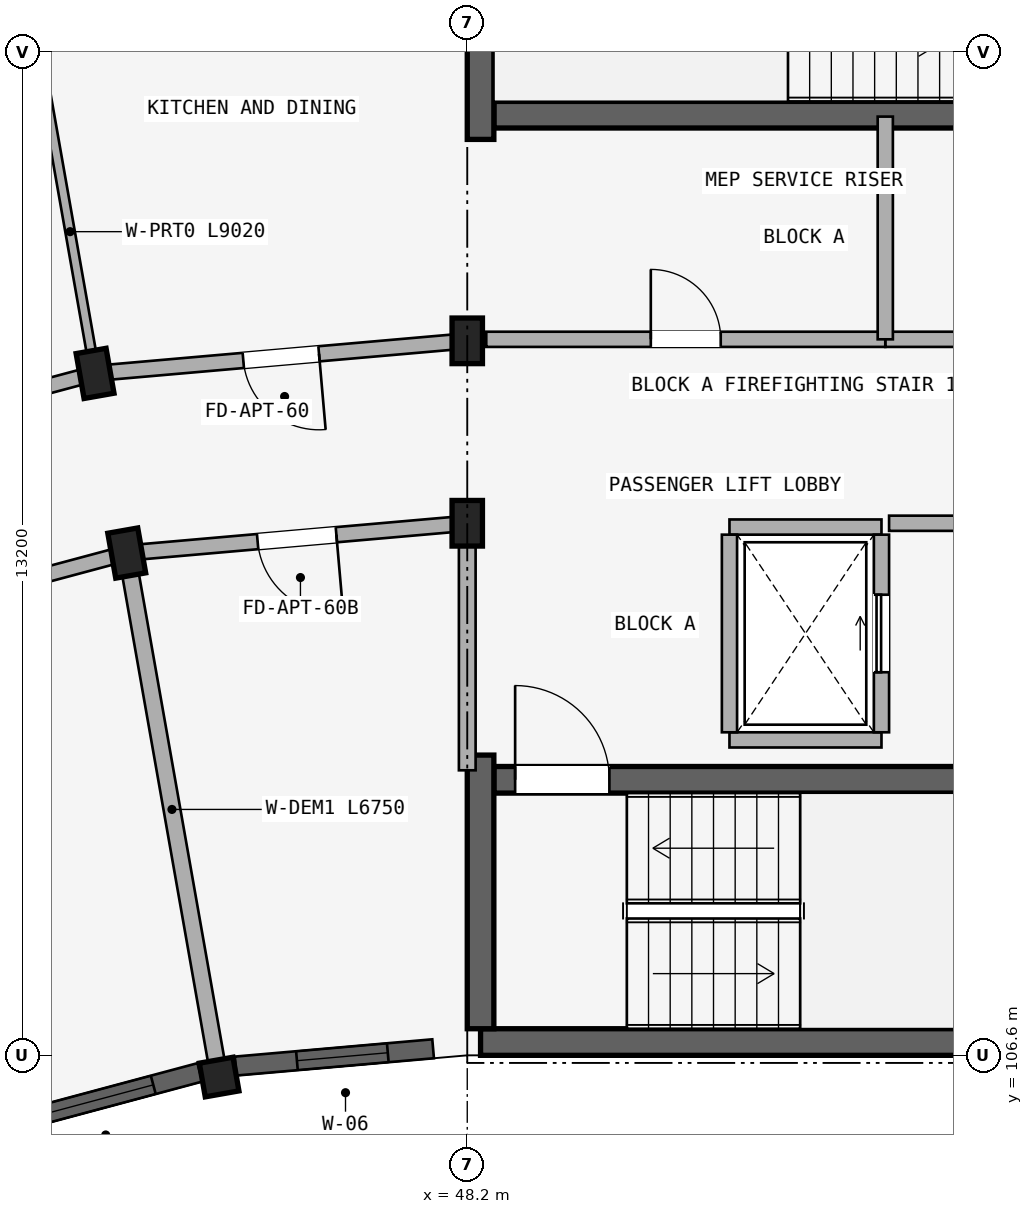
"""IFC4 building model, lengths in metres.
Left out: names, types, materials, properties, quantities, classifications, styles, units other than length and angle.
Written with IfcOpenShell. Run it as: python <this file> out.ifc"""

import sys

from ifc_helpers import new_model, si_unit, direction, frame, frame_2d, origin, origin_2d, place, context, subcontext, project, spatial, rectangle, extrude, element, fill, save


model = new_model("IFC4")
c1 = context("Model", 3, precision=1e-05, world=origin(), true_north=direction((0.0, 1.0)))
c2 = subcontext(c1, "Body", "Model", "MODEL_VIEW")
j1 = project(units=[si_unit("LENGTHUNIT", "METRE"), si_unit("PLANEANGLEUNIT", "RADIAN")], contexts=[c1])
p1 = place(None, origin())
s1 = spatial("IfcSite", under=j1, at=p1, CompositionType="ELEMENT")
p2 = place(p1, origin())
s2 = spatial("IfcBuilding", under=s1, at=p2, CompositionType="ELEMENT")
p3 = place(p2, frame((0.0, 0.0, 46.5)))
s3 = spatial("IfcBuildingStorey", under=s2, at=p3, CompositionType="ELEMENT", Elevation=46.5)
p4 = place(p3, frame((48.55, 118.975, 0.0), z_axis=(0.0, 0.0, 1.0), x_axis=(1.0, 0.0, 0.0)))
e1 = element("IfcWall", 1, at=p4, inside=s3, PredefinedType="SHEAR", context=c2, shape_type="SweptSolid", body=[
    extrude(rectangle(XDim=8.075, YDim=0.35, at=frame_2d((4.038, 0.0))), origin(), (0.0, 0.0, 1.0), 2.93),
])
p5 = place(p4, frame((6.38, 0.0, 0.0)))
e2 = element("IfcOpeningElement", 2, at=p5, cuts=e1, PredefinedType="OPENING", context=c2, shape_type="SweptSolid", body=[
    extrude(rectangle(XDim=1.24, YDim=2.15, at=frame_2d((0.62, 1.075))), frame((0.0, 0.185, 0.0), z_axis=(0.0, -1.0, 0.0), x_axis=(1.0, 0.0, 0.0)), (0.0, 0.0, 1.0), 0.37),
])
p6 = place(p3, frame((48.375, 118.65, 0.0), z_axis=(0.0, 0.0, 1.0), x_axis=(0.0, 1.0, 0.0)))
e3 = element("IfcWall", 3, at=p6, inside=s3, PredefinedType="SHEAR", context=c2, shape_type="SweptSolid", body=[
    extrude(rectangle(XDim=3.6, YDim=0.35, at=frame_2d((1.8, 0.0))), origin(), (0.0, 0.0, 1.0), 2.93),
])
p7 = place(p3, frame((48.375, 106.775, 0.0), z_axis=(0.0, 0.0, 1.0), x_axis=(1.0, 0.0, 0.0)))
e4 = element("IfcWall", 4, at=p7, inside=s3, PredefinedType="SHEAR", context=c2, shape_type="SweptSolid", body=[
    extrude(rectangle(XDim=8.25, YDim=0.35, at=frame_2d((4.125, 0.0))), origin(), (0.0, 0.0, 1.0), 2.93),
])
p8 = place(p3, frame((48.55, 110.225, 0.0), z_axis=(0.0, 0.0, 1.0), x_axis=(1.0, 0.0, 0.0)))
e5 = element("IfcWall", 5, at=p8, inside=s3, PredefinedType="SHEAR", context=c2, shape_type="SweptSolid", body=[
    extrude(rectangle(XDim=7.9, YDim=0.35, at=frame_2d((3.95, 0.0))), origin(), (0.0, 0.0, 1.0), 2.93),
])
p9 = place(p8, frame((0.28, 0.0, 0.0)))
e6 = element("IfcOpeningElement", 6, at=p9, cuts=e5, PredefinedType="OPENING", context=c2, shape_type="SweptSolid", body=[
    extrude(rectangle(XDim=1.24, YDim=2.15, at=frame_2d((0.62, 1.075))), frame((0.0, 0.185, 0.0), z_axis=(0.0, -1.0, 0.0), x_axis=(1.0, 0.0, 0.0)), (0.0, 0.0, 1.0), 0.37),
])
p10 = place(p3, frame((48.375, 106.95, 0.0), z_axis=(0.0, 0.0, 1.0), x_axis=(0.0, 1.0, 0.0)))
e7 = element("IfcWall", 7, at=p10, inside=s3, PredefinedType="SHEAR", context=c2, shape_type="SweptSolid", body=[
    extrude(rectangle(XDim=3.6, YDim=0.35, at=frame_2d((1.8, 0.0))), origin(), (0.0, 0.0, 1.0), 2.93),
])
for number, where, z_axis, x_axis in (
    (8, (48.2, 113.6, 0.0), (0.0, 0.0, 1.0), (1.0, 0.0, 0.0)),
    (9, (48.2, 116.0, 0.0), (0.0, 0.0, 1.0), (1.0, 0.0, 0.0)),
):
    element("IfcColumn", number, at=place(p3, frame(where, z_axis=z_axis, x_axis=x_axis)), inside=s3, PredefinedType="COLUMN", context=c2, shape_type="SweptSolid", body=[
        extrude(rectangle(XDim=0.4, YDim=0.6, at=origin_2d()), origin(), (0.0, 0.0, 1.0), 2.93),
    ])
p11 = place(p3, frame((44.935, 106.314, 0.0), z_axis=(0.0, 0.0, 1.0), x_axis=(0.984807753012, 0.173648177667, 0.0)))
e10 = element("IfcColumn", 10, at=p11, inside=s3, PredefinedType="COLUMN", context=c2, shape_type="SweptSolid", body=[
    extrude(rectangle(XDim=0.45, YDim=0.45, at=origin_2d()), origin(), (0.0, 0.0, 1.0), 2.93),
])
for number, where, z_axis, x_axis in (
    (11, (43.72, 113.208, 0.0), (0.0, 0.0, 1.0), (0.985, 0.174, 0.0)),
    (12, (43.303, 115.572, 0.0), (0.0, 0.0, 1.0), (0.985, 0.174, 0.0)),
):
    element("IfcColumn", number, at=place(p3, frame(where, z_axis=z_axis, x_axis=x_axis)), inside=s3, PredefinedType="COLUMN", context=c2, shape_type="SweptSolid", body=[
        extrude(rectangle(XDim=0.4, YDim=0.6, at=origin_2d()), origin(), (0.0, 0.0, 1.0), 2.93),
    ])
p12 = place(p3, frame((53.7, 116.02, 0.0), z_axis=(0.0, 0.0, 1.0), x_axis=(1.0, 0.0, 0.0)))
e13 = element("IfcWall", 13, at=p12, inside=s3, PredefinedType="STANDARD", context=c2, shape_type="SweptSolid", body=[
    extrude(rectangle(XDim=5.65, YDim=0.2, at=frame_2d((2.825, 0.0))), origin(), (0.0, 0.0, 1.0), 2.372),
])
p13 = place(p12, frame((1.923, 0.0, 0.0)))
e14 = element("IfcOpeningElement", 14, at=p13, cuts=e13, PredefinedType="OPENING", context=c2, shape_type="SweptSolid", body=[
    extrude(rectangle(XDim=1.24, YDim=2.15, at=frame_2d((0.62, 1.075))), frame((0.0, 0.11, 0.0), z_axis=(0.0, -1.0, 0.0), x_axis=(1.0, 0.0, 0.0)), (0.0, 0.0, 1.0), 0.22),
])
p14 = place(p3, frame((48.45, 116.02, 0.0), z_axis=(0.0, 0.0, 1.0), x_axis=(1.0, 0.0, 0.0)))
e15 = element("IfcWall", 15, at=p14, inside=s3, PredefinedType="STANDARD", context=c2, shape_type="SweptSolid", body=[
    extrude(rectangle(XDim=5.25, YDim=0.2, at=frame_2d((2.625, 0.0))), origin(), (0.0, 0.0, 1.0), 2.372),
])
p15 = place(p14, frame((2.165, 0.0, 0.0)))
e16 = element("IfcOpeningElement", 16, at=p15, cuts=e15, PredefinedType="OPENING", context=c2, shape_type="SweptSolid", body=[
    extrude(rectangle(XDim=0.92, YDim=2.1, at=frame_2d((0.46, 1.05))), frame((0.0, 0.11, 0.0), z_axis=(0.0, -1.0, 0.0), x_axis=(1.0, 0.0, 0.0)), (0.0, 0.0, 1.0), 0.22),
])
p16 = place(p3, frame((53.7, 116.02, 0.0), z_axis=(0.0, 0.0, 1.0), x_axis=(0.0, 1.0, 0.0)))
e17 = element("IfcWall", 17, at=p16, inside=s3, PredefinedType="STANDARD", context=c2, shape_type="SweptSolid", body=[
    extrude(rectangle(XDim=2.93, YDim=0.2, at=frame_2d((1.465, 0.0))), origin(), (0.0, 0.0, 1.0), 2.372),
])
p17 = place(p3, frame((51.65, 110.75, 0.0), z_axis=(0.0, 0.0, 1.0), x_axis=(1.0, 0.0, 0.0)))
e18 = element("IfcWall", 18, at=p17, inside=s3, PredefinedType="STANDARD", context=c2, shape_type="SweptSolid", body=[
    extrude(rectangle(XDim=2.0, YDim=0.2, at=frame_2d((1.0, 0.0))), origin(), (0.0, 0.0, 1.0), 2.93),
])
p18 = place(p3, frame((51.65, 113.55, 0.0), z_axis=(0.0, 0.0, 1.0), x_axis=(1.0, 0.0, 0.0)))
e19 = element("IfcWall", 19, at=p18, inside=s3, PredefinedType="STANDARD", context=c2, shape_type="SweptSolid", body=[
    extrude(rectangle(XDim=2.0, YDim=0.2, at=frame_2d((1.0, 0.0))), origin(), (0.0, 0.0, 1.0), 2.372),
])
p19 = place(p3, frame((51.65, 110.85, 0.0), z_axis=(0.0, 0.0, 1.0), x_axis=(0.0, 1.0, 0.0)))
e20 = element("IfcWall", 20, at=p19, inside=s3, PredefinedType="STANDARD", context=c2, shape_type="SweptSolid", body=[
    extrude(rectangle(XDim=2.6, YDim=0.2, at=frame_2d((1.3, 0.0))), origin(), (0.0, 0.0, 1.0), 2.372),
])
p20 = place(p3, frame((53.65, 110.85, 0.0), z_axis=(0.0, 0.0, 1.0), x_axis=(0.0, 1.0, 0.0)))
e21 = element("IfcWall", 21, at=p20, inside=s3, PredefinedType="STANDARD", context=c2, shape_type="SweptSolid", body=[
    extrude(rectangle(XDim=2.6, YDim=0.2, at=frame_2d((1.3, 0.0))), origin(), (0.0, 0.0, 1.0), 2.372),
])
p21 = place(p20, frame((0.79, 0.0, 0.0)))
e22 = element("IfcOpeningElement", 22, at=p21, cuts=e21, PredefinedType="OPENING", context=c2, shape_type="SweptSolid", body=[
    extrude(rectangle(XDim=1.02, YDim=2.15, at=frame_2d((0.51, 1.075))), frame((0.0, 0.11, 0.0), z_axis=(0.0, -1.0, 0.0), x_axis=(1.0, 0.0, 0.0)), (0.0, 0.0, 1.0), 0.22),
])
p22 = place(p3, frame((53.75, 113.6, 0.0), z_axis=(0.0, 0.0, 1.0), x_axis=(1.0, 0.0, 0.0)))
e23 = element("IfcWall", 23, at=p22, inside=s3, PredefinedType="STANDARD", context=c2, shape_type="SweptSolid", body=[
    extrude(rectangle(XDim=5.6, YDim=0.2, at=frame_2d((2.8, 0.0))), origin(), (0.0, 0.0, 1.0), 2.372),
])
p23 = place(p22, frame((1.91, 0.0, 0.0)))
e24 = element("IfcOpeningElement", 24, at=p23, cuts=e23, PredefinedType="OPENING", context=c2, shape_type="SweptSolid", body=[
    extrude(rectangle(XDim=1.22, YDim=2.15, at=frame_2d((0.61, 1.075))), frame((0.0, 0.11, 0.0), z_axis=(0.0, -1.0, 0.0), x_axis=(1.0, 0.0, 0.0)), (0.0, 0.0, 1.0), 0.22),
])
p24 = place(p3, frame((48.2, 113.6, 0.0), z_axis=(0.0, 0.0, 1.0), x_axis=(-0.996191949488, -0.087187153726, 0.0)))
e25 = element("IfcWall", 25, at=p24, inside=s3, PredefinedType="STANDARD", context=c2, shape_type="SweptSolid", body=[
    extrude(rectangle(XDim=4.497, YDim=0.2, at=frame_2d((2.249, 0.0))), origin(), (0.0, 0.0, 1.0), 2.372),
])
p25 = place(p24, frame((1.729, 0.0, 0.0)))
e26 = element("IfcOpeningElement", 26, at=p25, cuts=e25, PredefinedType="OPENING", context=c2, shape_type="SweptSolid", body=[
    extrude(rectangle(XDim=1.04, YDim=2.15, at=frame_2d((0.52, 1.075))), frame((0.0, 0.11, 0.0), z_axis=(0.0, -1.0, 0.0), x_axis=(1.0, 0.0, 0.0)), (0.0, 0.0, 1.0), 0.22),
])
p26 = place(p3, frame((48.2, 116.0, 0.0), z_axis=(0.0, 0.0, 1.0), x_axis=(-0.996193663584, -0.087167566415, 0.0)))
e27 = element("IfcWall", 27, at=p26, inside=s3, PredefinedType="STANDARD", context=c2, shape_type="SweptSolid", body=[
    extrude(rectangle(XDim=4.916, YDim=0.2, at=frame_2d((2.458, 0.0))), origin(), (0.0, 0.0, 1.0), 2.372),
])
p27 = place(p26, frame((1.958, 0.0, 0.0)))
e28 = element("IfcOpeningElement", 28, at=p27, cuts=e27, PredefinedType="OPENING", context=c2, shape_type="SweptSolid", body=[
    extrude(rectangle(XDim=1.0, YDim=2.15, at=frame_2d((0.5, 1.075))), frame((0.0, 0.11, 0.0), z_axis=(0.0, -1.0, 0.0), x_axis=(1.0, 0.0, 0.0)), (0.0, 0.0, 1.0), 0.22),
])
p28 = place(p3, frame((43.72, 113.208, 0.0), z_axis=(0.0, 0.0, 1.0), x_axis=(-0.965934240054, -0.258787642463, 0.0)))
e29 = element("IfcWall", 29, at=p28, inside=s3, PredefinedType="STANDARD", context=c2, shape_type="SweptSolid", body=[
    extrude(rectangle(XDim=4.497, YDim=0.2, at=frame_2d((2.249, 0.0))), origin(), (0.0, 0.0, 1.0), 2.372),
])
p29 = place(p28, frame((1.709, 0.0, 0.0)))
e30 = element("IfcOpeningElement", 30, at=p29, cuts=e29, PredefinedType="OPENING", context=c2, shape_type="SweptSolid", body=[
    extrude(rectangle(XDim=1.08, YDim=2.15, at=frame_2d((0.54, 1.075))), frame((0.0, 0.11, 0.0), z_axis=(0.0, -1.0, 0.0), x_axis=(1.0, 0.0, 0.0)), (0.0, 0.0, 1.0), 0.22),
])
p30 = place(p3, frame((43.303, 115.572, 0.0), z_axis=(0.0, 0.0, 1.0), x_axis=(-0.965930095386, -0.258803112091, 0.0)))
e31 = element("IfcWall", 31, at=p30, inside=s3, PredefinedType="STANDARD", context=c2, shape_type="SweptSolid", body=[
    extrude(rectangle(XDim=4.916, YDim=0.2, at=frame_2d((2.458, 0.0))), origin(), (0.0, 0.0, 1.0), 2.372),
])
p31 = place(p3, frame((48.2, 110.35, 0.0), z_axis=(0.0, 0.0, 1.0), x_axis=(0.0, 1.0, 0.0)))
e32 = element("IfcWall", 32, at=p31, inside=s3, PredefinedType="STANDARD", context=c2, shape_type="SweptSolid", body=[
    extrude(rectangle(XDim=3.2, YDim=0.22, at=frame_2d((1.6, 0.0))), origin(), (0.0, 0.0, 1.0), 2.372),
])
p32 = place(p3, frame((44.901, 106.511, 0.0), z_axis=(0.0, 0.0, 1.0), x_axis=(-0.173647089161, 0.984807944945, 0.0)))
e33 = element("IfcWall", 33, at=p32, inside=s3, PredefinedType="STANDARD", context=c2, shape_type="SweptSolid", body=[
    extrude(rectangle(XDim=6.75, YDim=0.22, at=frame_2d((3.375, 0.0))), origin(), (0.0, 0.0, 1.0), 2.372),
])
p33 = place(p3, frame((43.286, 115.67, 0.0), z_axis=(0.0, 0.0, 1.0), x_axis=(-0.173635554464, 0.98480997874, 0.0)))
e34 = element("IfcWall", 34, at=p33, inside=s3, PredefinedType="PARTITIONING", context=c2, shape_type="SweptSolid", body=[
    extrude(rectangle(XDim=9.02, YDim=0.125, at=frame_2d((4.51, 0.0))), origin(), (0.0, 0.0, 1.0), 2.372),
])
p34 = place(p33, frame((4.45, 0.0, 0.0)))
e35 = element("IfcOpeningElement", 35, at=p34, cuts=e34, PredefinedType="OPENING", context=c2, shape_type="SweptSolid", body=[
    extrude(rectangle(XDim=0.8, YDim=2.1, at=frame_2d((0.4, 1.05))), frame((0.0, 0.073, 0.0), z_axis=(0.0, -1.0, 0.0), x_axis=(1.0, 0.0, 0.0)), (0.0, 0.0, 1.0), 0.145),
])
p35 = place(p3, frame((47.751, 106.686, 0.0), z_axis=(0.0, 0.0, 1.0), x_axis=(-0.996188433092, -0.087227322402, 0.0)))
e36 = element("IfcWall", 36, at=p35, inside=s3, PredefinedType="STANDARD", context=c2, shape_type="SweptSolid", body=[
    extrude(rectangle(XDim=2.609, YDim=0.25, at=frame_2d((1.304, 0.0))), origin(), (0.0, 0.0, 1.0), 2.472),
])
p36 = place(p35, frame((0.599, 0.0, 0.772)))
e37 = element("IfcOpeningElement", 37, at=p36, cuts=e36, PredefinedType="OPENING", context=c2, shape_type="SweptSolid", body=[
    extrude(rectangle(XDim=1.2, YDim=1.5, at=frame_2d((0.6, 0.75))), frame((0.0, 0.135, 0.0), z_axis=(0.0, -1.0, 0.0), x_axis=(1.0, 0.0, 0.0)), (0.0, 0.0, 1.0), 0.27),
])
p37 = place(p3, frame((44.682, 106.376, 0.0), z_axis=(0.0, 0.0, 1.0), x_axis=(-0.965921001908, -0.258837049266, 0.0)))
e38 = element("IfcWall", 38, at=p37, inside=s3, PredefinedType="STANDARD", context=c2, shape_type="SweptSolid", body=[
    extrude(rectangle(XDim=2.82, YDim=0.25, at=frame_2d((1.41, 0.0))), origin(), (0.0, 0.0, 1.0), 2.472),
])
p38 = place(p37, frame((0.635, 0.0, 0.672)))
e39 = element("IfcOpeningElement", 39, at=p38, cuts=e38, PredefinedType="OPENING", context=c2, shape_type="SweptSolid", body=[
    extrude(rectangle(XDim=1.55, YDim=1.6, at=frame_2d((0.775, 0.8))), frame((0.0, 0.135, 0.0), z_axis=(0.0, -1.0, 0.0), x_axis=(1.0, 0.0, 0.0)), (0.0, 0.0, 1.0), 0.27),
])
p39 = place(p36, origin())
e40 = element("IfcWindow", 40, at=p39, inside=s3, PartitioningType="SINGLE_PANEL", PredefinedType="WINDOW", context=c2, shape_type="SweptSolid", body=[
    extrude(rectangle(XDim=1.2, YDim=1.5, at=frame_2d((0.6, 0.75))), frame((0.0, 0.03, 0.0), z_axis=(0.0, -1.0, 0.0), x_axis=(1.0, 0.0, 0.0)), (0.0, 0.0, 1.0), 0.06),
])
fill(e37, e40)
p40 = place(p38, origin())
e41 = element("IfcWindow", 41, at=p40, inside=s3, PartitioningType="DOUBLE_PANEL_VERTICAL", PredefinedType="WINDOW", context=c2, shape_type="SweptSolid", body=[
    extrude(rectangle(XDim=1.55, YDim=1.6, at=frame_2d((0.775, 0.8))), frame((0.0, 0.03, 0.0), z_axis=(0.0, -1.0, 0.0), x_axis=(1.0, 0.0, 0.0)), (0.0, 0.0, 1.0), 0.06),
])
fill(e39, e41)
p41 = place(p15, origin())
e42 = element("IfcDoor", 42, at=p41, inside=s3, OperationType="SINGLE_SWING_LEFT", PredefinedType="DOOR", context=c2, shape_type="SweptSolid", body=[
    extrude(rectangle(XDim=0.92, YDim=2.1, at=frame_2d((0.46, 1.05))), frame((0.0, 0.025, 0.0), z_axis=(0.0, -1.0, 0.0), x_axis=(1.0, 0.0, 0.0)), (0.0, 0.0, 1.0), 0.05),
])
fill(e16, e42)
p42 = place(p9, frame((1.24, 0.0, 0.0), z_axis=(0.0, 0.0, 1.0), x_axis=(-1.0, 0.0, 0.0)))
e43 = element("IfcDoor", 43, at=p42, inside=s3, OperationType="SINGLE_SWING_RIGHT", PredefinedType="DOOR", context=c2, shape_type="SweptSolid", body=[
    extrude(rectangle(XDim=1.24, YDim=2.15, at=frame_2d((0.62, 1.075))), frame((0.0, 0.025, 0.0), z_axis=(0.0, -1.0, 0.0), x_axis=(1.0, 0.0, 0.0)), (0.0, 0.0, 1.0), 0.05),
])
fill(e6, e43)
p43 = place(p21, origin())
e44 = element("IfcDoor", 44, at=p43, inside=s3, OperationType="SLIDING_TO_RIGHT", PredefinedType="DOOR", context=c2, shape_type="SweptSolid", body=[
    extrude(rectangle(XDim=1.02, YDim=2.15, at=frame_2d((0.51, 1.075))), frame((0.0, 0.025, 0.0), z_axis=(0.0, -1.0, 0.0), x_axis=(1.0, 0.0, 0.0)), (0.0, 0.0, 1.0), 0.05),
])
fill(e22, e44)
p44 = place(p27, frame((1.0, 0.0, 0.0), z_axis=(0.0, 0.0, 1.0), x_axis=(-1.0, 0.0, 0.0)))
e45 = element("IfcDoor", 45, at=p44, inside=s3, OperationType="SINGLE_SWING_RIGHT", PredefinedType="DOOR", context=c2, shape_type="SweptSolid", body=[
    extrude(rectangle(XDim=1.0, YDim=2.15, at=frame_2d((0.5, 1.075))), frame((0.0, 0.025, 0.0), z_axis=(0.0, -1.0, 0.0), x_axis=(1.0, 0.0, 0.0)), (0.0, 0.0, 1.0), 0.05),
])
fill(e28, e45)
p45 = place(p25, frame((1.04, 0.0, 0.0), z_axis=(0.0, 0.0, 1.0), x_axis=(-1.0, 0.0, 0.0)))
e46 = element("IfcDoor", 46, at=p45, inside=s3, OperationType="SINGLE_SWING_RIGHT", PredefinedType="DOOR", context=c2, shape_type="SweptSolid", body=[
    extrude(rectangle(XDim=1.04, YDim=2.15, at=frame_2d((0.52, 1.075))), frame((0.0, 0.025, 0.0), z_axis=(0.0, -1.0, 0.0), x_axis=(1.0, 0.0, 0.0)), (0.0, 0.0, 1.0), 0.05),
])
fill(e26, e46)
save(model, sys.argv[1])
